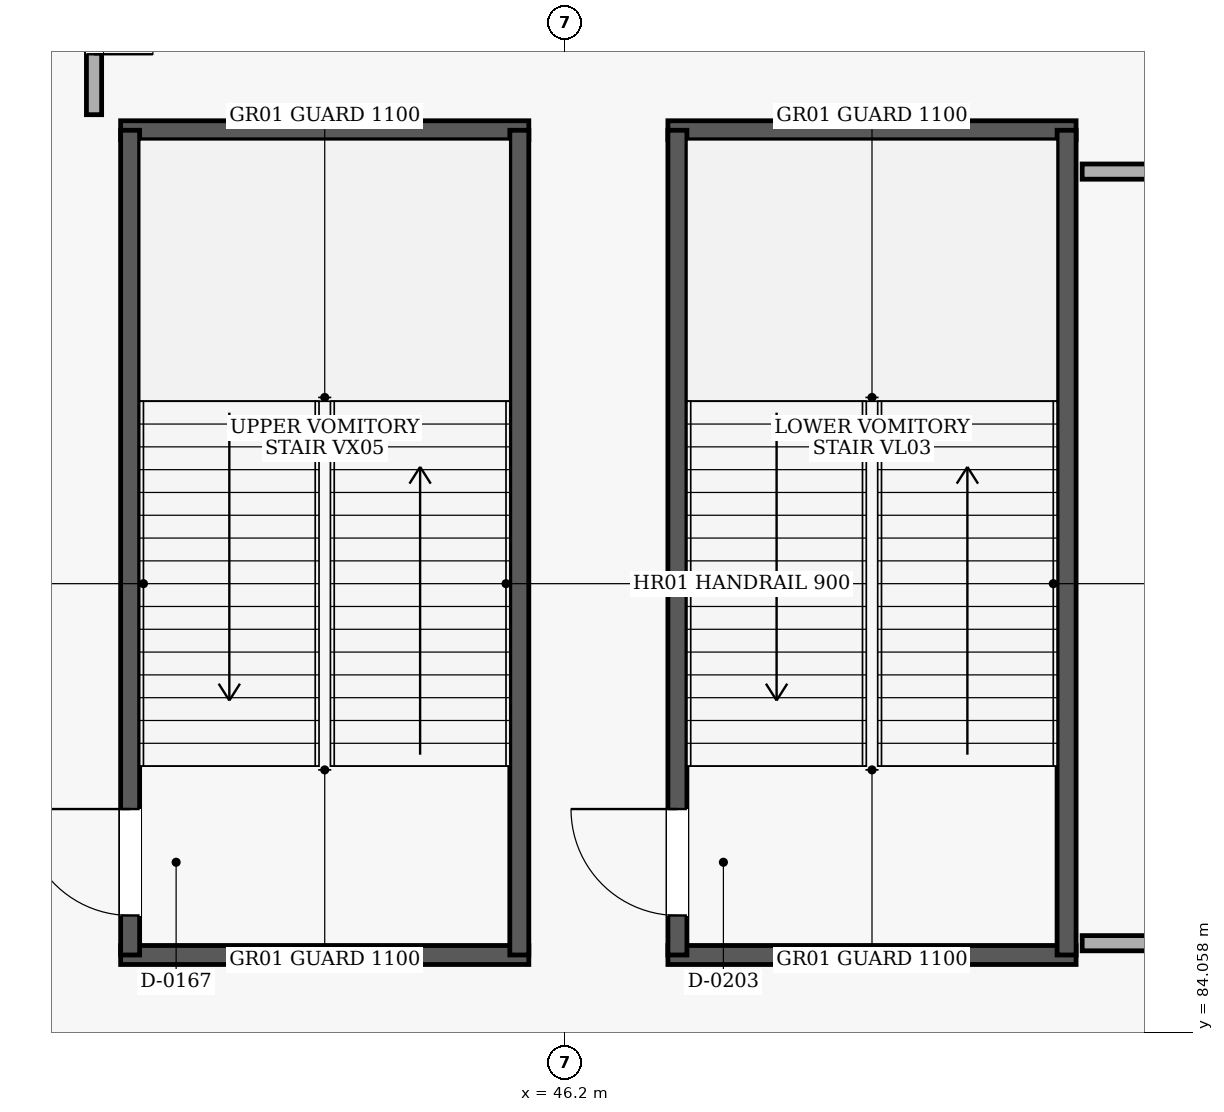
"""IFC4 building model, lengths in metres.
Left out: names, types, materials, properties, quantities, classifications, styles, units other than length and angle.
Written with IfcOpenShell. Run it as: python <this file> out.ifc"""

import sys

from ifc_helpers import new_model, si_unit, direction, frame, frame_2d, origin, place, context, subcontext, project, spatial, rectangle, extrude, element, fill, save


model = new_model("IFC4")
c1 = context("Model", 3, precision=1e-05, world=origin(), true_north=direction((0.0, 1.0)))
c2 = subcontext(c1, "Body", "Model", "MODEL_VIEW")
j1 = project(units=[si_unit("LENGTHUNIT", "METRE"), si_unit("PLANEANGLEUNIT", "RADIAN")], contexts=[c1])
p1 = place(None, origin())
s1 = spatial("IfcSite", under=j1, at=p1, CompositionType="ELEMENT")
p2 = place(p1, origin())
s2 = spatial("IfcBuilding", under=s1, at=p2, CompositionType="ELEMENT")
p3 = place(p2, origin())
s3 = spatial("IfcBuildingStorey", under=s2, at=p3, CompositionType="ELEMENT", Elevation=0.0)
for number, where, z_axis, x_axis in (
    (1, (40.35, 85.075, 0.0), (0.0, 0.0, 1.0), (1.0, 0.0, 0.0)),
    (2, (45.72, 95.925, 0.0), (0.0, 0.0, 1.0), (-1.0, 0.0, 0.0)),
):
    element("IfcWall", number, at=place(p3, frame(where, z_axis=z_axis, x_axis=x_axis)), inside=s3, PredefinedType="SHEAR", context=c2, shape_type="SweptSolid", body=[
        extrude(rectangle(XDim=5.37, YDim=0.25, at=frame_2d((2.685, 0.0))), origin(), (0.0, 0.0, 1.0), 5.08),
    ])
p4 = place(p3, frame((40.475, 85.075, 0.0), z_axis=(0.0, 0.0, 1.0), x_axis=(0.0, 1.0, 0.0)))
e3 = element("IfcWall", 3, at=p4, inside=s3, PredefinedType="SHEAR", context=c2, shape_type="SweptSolid", body=[
    extrude(rectangle(XDim=10.85, YDim=0.25, at=frame_2d((5.425, 0.0))), origin(), (0.0, 0.0, 1.0), 5.08),
])
p5 = place(p4, frame((0.52, 0.0, 0.0)))
e4 = element("IfcOpeningElement", 4, at=p5, cuts=e3, PredefinedType="OPENING", context=c2, shape_type="SweptSolid", body=[
    extrude(rectangle(XDim=1.4, YDim=2.15, at=frame_2d((0.7, 1.075))), frame((0.0, 0.135, 0.0), z_axis=(0.0, -1.0, 0.0), x_axis=(1.0, 0.0, 0.0)), (0.0, 0.0, 1.0), 0.27),
])
p6 = place(p3, frame((45.595, 85.075, 0.0), z_axis=(0.0, 0.0, 1.0), x_axis=(0.0, 1.0, 0.0)))
e5 = element("IfcWall", 5, at=p6, inside=s3, PredefinedType="SHEAR", context=c2, shape_type="SweptSolid", body=[
    extrude(rectangle(XDim=10.85, YDim=0.25, at=frame_2d((5.425, 0.0))), origin(), (0.0, 0.0, 1.0), 5.08),
])
for number, where, z_axis, x_axis in (
    (6, (47.55, 85.075, 0.0), (0.0, 0.0, 1.0), (1.0, 0.0, 0.0)),
    (7, (52.92, 95.925, 0.0), (0.0, 0.0, 1.0), (-1.0, 0.0, 0.0)),
):
    element("IfcWall", number, at=place(p3, frame(where, z_axis=z_axis, x_axis=x_axis)), inside=s3, PredefinedType="SHEAR", context=c2, shape_type="SweptSolid", body=[
        extrude(rectangle(XDim=5.37, YDim=0.25, at=frame_2d((2.685, 0.0))), origin(), (0.0, 0.0, 1.0), 5.08),
    ])
p7 = place(p3, frame((47.675, 85.075, 0.0), z_axis=(0.0, 0.0, 1.0), x_axis=(0.0, 1.0, 0.0)))
e8 = element("IfcWall", 8, at=p7, inside=s3, PredefinedType="SHEAR", context=c2, shape_type="SweptSolid", body=[
    extrude(rectangle(XDim=10.85, YDim=0.25, at=frame_2d((5.425, 0.0))), origin(), (0.0, 0.0, 1.0), 5.08),
])
p8 = place(p7, frame((0.52, 0.0, 0.0)))
e9 = element("IfcOpeningElement", 9, at=p8, cuts=e8, PredefinedType="OPENING", context=c2, shape_type="SweptSolid", body=[
    extrude(rectangle(XDim=1.4, YDim=2.15, at=frame_2d((0.7, 1.075))), frame((0.0, 0.135, 0.0), z_axis=(0.0, -1.0, 0.0), x_axis=(1.0, 0.0, 0.0)), (0.0, 0.0, 1.0), 0.27),
])
p9 = place(p3, frame((52.795, 85.075, 0.0), z_axis=(0.0, 0.0, 1.0), x_axis=(0.0, 1.0, 0.0)))
e10 = element("IfcWall", 10, at=p9, inside=s3, PredefinedType="SHEAR", context=c2, shape_type="SweptSolid", body=[
    extrude(rectangle(XDim=10.85, YDim=0.25, at=frame_2d((5.425, 0.0))), origin(), (0.0, 0.0, 1.0), 5.08),
])
p10 = place(p3, frame((53.0, 85.23, 0.0), z_axis=(0.0, 0.0, 1.0), x_axis=(1.0, 0.0, 0.0)))
e11 = element("IfcWall", 11, at=p10, inside=s3, PredefinedType="PARTITIONING", context=c2, shape_type="SweptSolid", body=[
    extrude(rectangle(XDim=15.4, YDim=0.2, at=frame_2d((7.7, 0.0))), origin(), (0.0, 0.0, 1.0), 5.08),
])
p11 = place(p10, frame((5.936, 0.0, 0.0)))
e12 = element("IfcOpeningElement", 12, at=p11, cuts=e11, PredefinedType="OPENING", context=c2, shape_type="SweptSolid", body=[
    extrude(rectangle(XDim=1.4, YDim=2.2, at=frame_2d((0.7, 1.1))), frame((0.0, 0.11, 0.0), z_axis=(0.0, -1.0, 0.0), x_axis=(1.0, 0.0, 0.0)), (0.0, 0.0, 1.0), 0.22),
])
p12 = place(p3, frame((68.4, 95.381, 0.0), z_axis=(0.0, 0.0, 1.0), x_axis=(-1.0, 0.0, 0.0)))
e13 = element("IfcWall", 13, at=p12, inside=s3, PredefinedType="PARTITIONING", context=c2, shape_type="SweptSolid", body=[
    extrude(rectangle(XDim=15.4, YDim=0.2, at=frame_2d((7.7, 0.0))), origin(), (0.0, 0.0, 1.0), 5.08),
])
p13 = place(p3, frame((40.0, 99.27, 0.0), z_axis=(0.0, 0.0, 1.0), x_axis=(0.0, -1.0, 0.0)))
e14 = element("IfcWall", 14, at=p13, inside=s3, PredefinedType="PARTITIONING", context=c2, shape_type="SweptSolid", body=[
    extrude(rectangle(XDim=3.14, YDim=0.2, at=frame_2d((1.57, 0.0))), origin(), (0.0, 0.0, 1.0), 5.08),
])
p14 = place(p13, frame((0.795, 0.0, 0.0)))
e15 = element("IfcOpeningElement", 15, at=p14, cuts=e14, PredefinedType="OPENING", context=c2, shape_type="SweptSolid", body=[
    extrude(rectangle(XDim=1.55, YDim=2.2, at=frame_2d((0.775, 1.1))), frame((0.0, 0.11, 0.0), z_axis=(0.0, -1.0, 0.0), x_axis=(1.0, 0.0, 0.0)), (0.0, 0.0, 1.0), 0.22),
])
p15 = place(p5, origin())
e16 = element("IfcDoor", 16, at=p15, inside=s3, OperationType="SINGLE_SWING_RIGHT", PredefinedType="DOOR", context=c2, shape_type="SweptSolid", body=[
    extrude(rectangle(XDim=1.4, YDim=2.15, at=frame_2d((0.7, 1.075))), frame((0.0, 0.025, 0.0), z_axis=(0.0, -1.0, 0.0), x_axis=(1.0, 0.0, 0.0)), (0.0, 0.0, 1.0), 0.05),
])
fill(e4, e16)
p16 = place(p8, origin())
e17 = element("IfcDoor", 17, at=p16, inside=s3, OperationType="SINGLE_SWING_RIGHT", PredefinedType="DOOR", context=c2, shape_type="SweptSolid", body=[
    extrude(rectangle(XDim=1.4, YDim=2.15, at=frame_2d((0.7, 1.075))), frame((0.0, 0.025, 0.0), z_axis=(0.0, -1.0, 0.0), x_axis=(1.0, 0.0, 0.0)), (0.0, 0.0, 1.0), 0.05),
])
fill(e9, e17)
p17 = place(p14, origin())
e18 = element("IfcDoor", 18, at=p17, inside=s3, OperationType="DOUBLE_DOOR_SINGLE_SWING", PredefinedType="DOOR", context=c2, shape_type="SweptSolid", body=[
    extrude(rectangle(XDim=1.55, YDim=2.2, at=frame_2d((0.775, 1.1))), frame((0.0, 0.025, 0.0), z_axis=(0.0, -1.0, 0.0), x_axis=(1.0, 0.0, 0.0)), (0.0, 0.0, 1.0), 0.05),
])
fill(e15, e18)
save(model, sys.argv[1])
